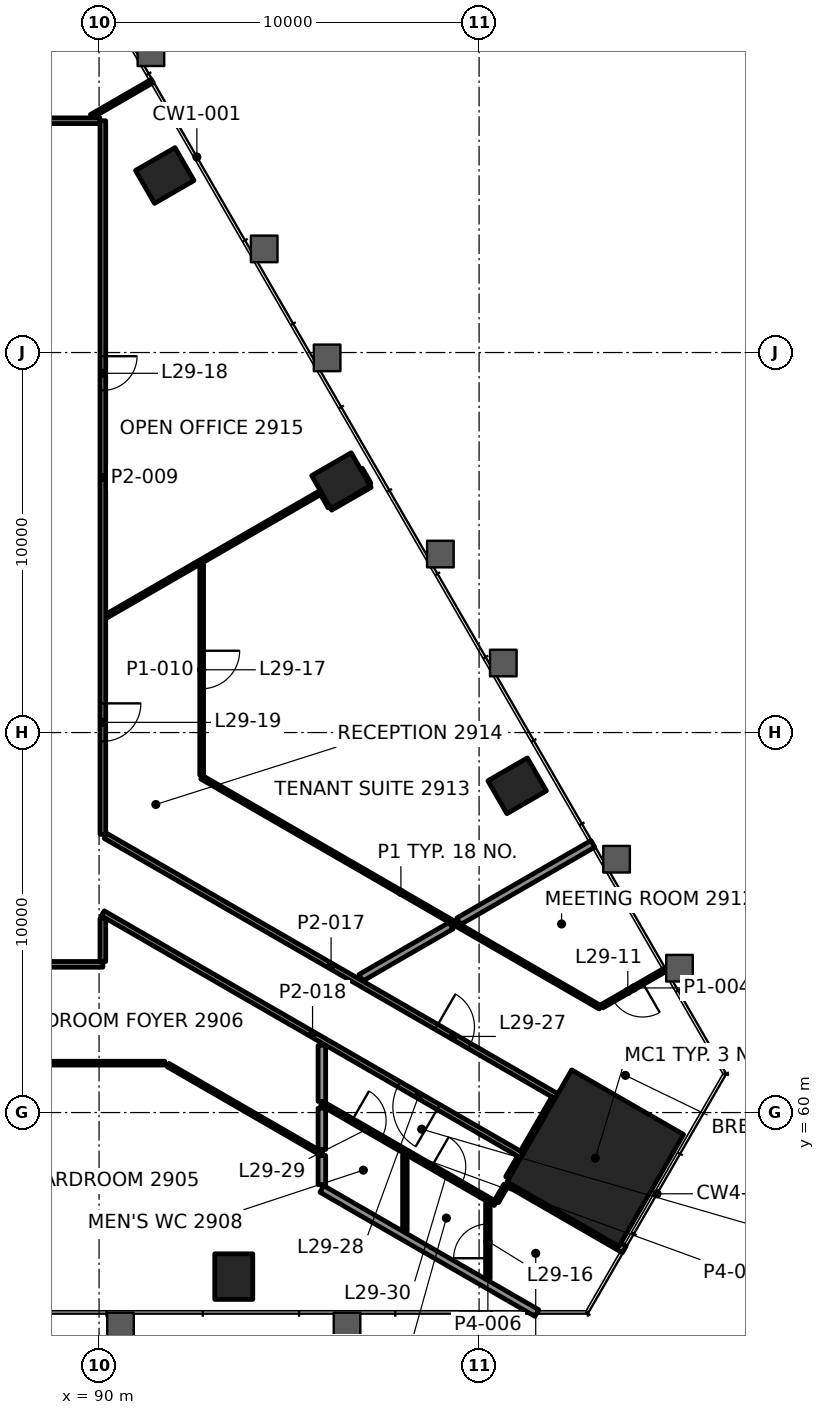
"""IFC4 building model, lengths in metres.
Left out: names, types, materials, properties, quantities, classifications, styles, units other than length and angle.
Written with IfcOpenShell. Run it as: python <this file> out.ifc"""

import sys

from ifc_helpers import new_model, si_unit, direction, frame, frame_2d, origin, origin_2d, place, context, subcontext, project, spatial, rectangle, extrude, element, fill, save


model = new_model("IFC4")
c1 = context("Model", 3, precision=1e-05, world=origin(), true_north=direction((0.0, 1.0)))
c2 = subcontext(c1, "Body", "Model", "MODEL_VIEW")
j1 = project(units=[si_unit("LENGTHUNIT", "METRE"), si_unit("PLANEANGLEUNIT", "RADIAN")], contexts=[c1])
p1 = place(None, origin())
s1 = spatial("IfcSite", under=j1, at=p1, CompositionType="ELEMENT")
p2 = place(p1, origin())
s2 = spatial("IfcBuilding", under=s1, at=p2, CompositionType="ELEMENT")
p3 = place(p2, frame((0.0, 0.0, 128.2)))
s3 = spatial("IfcBuildingStorey", under=s2, at=p3, CompositionType="ELEMENT", Elevation=128.2)
p4 = place(p3, frame((103.058, 58.801, 0.0), z_axis=(0.0, 0.0, 1.0), x_axis=(0.5, 0.866025403784, 0.0)))
e1 = element("IfcColumn", 1, at=p4, inside=s3, PredefinedType="COLUMN", context=c2, shape_type="SweptSolid", body=[
    extrude(rectangle(XDim=3.4, YDim=3.4, at=origin_2d()), origin(), (0.0, 0.0, 1.0), 4.2),
])
for number, where, z_axis, x_axis in (
    (2, (93.545, 55.683, -0.0), (0.0, 0.0, 1.0), (1.0, 0.0, 0.0)),
    (3, (101.001, 68.598, -0.0), (0.0, 0.0, 1.0), (-0.5, 0.866, 0.0)),
    (4, (96.365, 76.628, -0.0), (0.0, 0.0, 1.0), (-0.5, 0.866, 0.0)),
    (5, (91.729, 84.658, -0.0), (0.0, 0.0, 1.0), (-0.5, 0.866, 0.0)),
):
    element("IfcColumn", number, at=place(p3, frame(where, z_axis=z_axis, x_axis=x_axis)), inside=s3, PredefinedType="COLUMN", context=c2, shape_type="SweptSolid", body=[
        extrude(rectangle(XDim=1.0, YDim=1.2, at=origin_2d()), origin(), (0.0, 0.0, 1.0), 4.2),
    ])
p5 = place(p3, frame((63.41, 61.3, 0.0), z_axis=(0.0, 0.0, 1.0), x_axis=(1.0, 0.0, 0.0)))
e6 = element("IfcWall", 6, at=p5, inside=s3, PredefinedType="PARTITIONING", context=c2, shape_type="SweptSolid", body=[
    extrude(rectangle(XDim=28.319, YDim=0.1, at=frame_2d((14.16, 0.0))), origin(), (0.0, 0.0, 1.0), 3.4),
])
p6 = place(p5, frame((7.613, 0.0, 0.0)))
e7 = element("IfcOpeningElement", 7, at=p6, cuts=e6, PredefinedType="OPENING", context=c2, shape_type="SweptSolid", body=[
    extrude(rectangle(XDim=1.2, YDim=2.1, at=frame_2d((0.6, 1.05))), frame((0.0, 0.06, 0.0), z_axis=(0.0, -1.0, 0.0), x_axis=(1.0, 0.0, 0.0)), (0.0, 0.0, 1.0), 0.12),
])
p7 = place(p5, frame((21.573, 0.0, 0.0)))
e8 = element("IfcOpeningElement", 8, at=p7, cuts=e6, PredefinedType="OPENING", context=c2, shape_type="SweptSolid", body=[
    extrude(rectangle(XDim=1.2, YDim=2.1, at=frame_2d((0.6, 1.05))), frame((0.0, 0.06, 0.0), z_axis=(0.0, -1.0, 0.0), x_axis=(1.0, 0.0, 0.0)), (0.0, 0.0, 1.0), 0.12),
])
p8 = place(p3, frame((90.1, 63.9, 0.0), z_axis=(0.0, 0.0, 1.0), x_axis=(-1.0, 0.0, 0.0)))
e9 = element("IfcWall", 9, at=p8, inside=s3, PredefinedType="PARTITIONING", context=c2, shape_type="SweptSolid", body=[
    extrude(rectangle(XDim=30.2, YDim=0.15, at=frame_2d((15.1, 0.0))), origin(), (0.0, 0.0, 1.0), 3.4),
])
p9 = place(p8, frame((4.833, 0.0, 0.0)))
e10 = element("IfcOpeningElement", 10, at=p9, cuts=e9, PredefinedType="OPENING", context=c2, shape_type="SweptSolid", body=[
    extrude(rectangle(XDim=1.0, YDim=2.1, at=frame_2d((0.5, 1.05))), frame((0.0, 0.085, 0.0), z_axis=(0.0, -1.0, 0.0), x_axis=(1.0, 0.0, 0.0)), (0.0, 0.0, 1.0), 0.17),
])
p10 = place(p8, frame((18.077, 0.0, 0.0)))
e11 = element("IfcOpeningElement", 11, at=p10, cuts=e9, PredefinedType="OPENING", context=c2, shape_type="SweptSolid", body=[
    extrude(rectangle(XDim=1.0, YDim=2.1, at=frame_2d((0.5, 1.05))), frame((0.0, 0.085, 0.0), z_axis=(0.0, -1.0, 0.0), x_axis=(1.0, 0.0, 0.0)), (0.0, 0.0, 1.0), 0.17),
])
p11 = place(p8, frame((27.893, 0.0, 0.0)))
e12 = element("IfcOpeningElement", 12, at=p11, cuts=e9, PredefinedType="OPENING", context=c2, shape_type="SweptSolid", body=[
    extrude(rectangle(XDim=0.9, YDim=2.1, at=frame_2d((0.45, 1.05))), frame((0.0, 0.085, 0.0), z_axis=(0.0, -1.0, 0.0), x_axis=(1.0, 0.0, 0.0)), (0.0, 0.0, 1.0), 0.17),
])
p12 = place(p3, frame((80.375, 86.1, 0.0), z_axis=(0.0, 0.0, 1.0), x_axis=(1.0, 0.0, 0.0)))
e13 = element("IfcWall", 13, at=p12, inside=s3, PredefinedType="PARTITIONING", context=c2, shape_type="SweptSolid", body=[
    extrude(rectangle(XDim=9.649, YDim=0.15, at=frame_2d((4.825, 0.0))), origin(), (0.0, 0.0, 1.0), 3.4),
])
p13 = place(p12, frame((4.11, 0.0, 0.0)))
e14 = element("IfcOpeningElement", 14, at=p13, cuts=e13, PredefinedType="OPENING", context=c2, shape_type="SweptSolid", body=[
    extrude(rectangle(XDim=1.2, YDim=2.1, at=frame_2d((0.6, 1.05))), frame((0.0, 0.085, 0.0), z_axis=(0.0, -1.0, 0.0), x_axis=(1.0, 0.0, 0.0)), (0.0, 0.0, 1.0), 0.17),
])
p14 = place(p3, frame((104.903, 63.761, 0.0), z_axis=(0.0, 0.0, 1.0), x_axis=(-0.86605048973, -0.49995654735, 0.0)))
e15 = element("IfcWall", 15, at=p14, inside=s3, PredefinedType="PARTITIONING", context=c2, shape_type="SweptSolid", body=[
    extrude(rectangle(XDim=1.926, YDim=0.1, at=frame_2d((0.963, 0.0))), origin(), (0.0, 0.0, 1.0), 3.4),
])
p15 = place(p14, frame((0.693, 0.0, 0.0)))
e16 = element("IfcOpeningElement", 16, at=p15, cuts=e15, PredefinedType="OPENING", context=c2, shape_type="SweptSolid", body=[
    extrude(rectangle(XDim=0.9, YDim=2.1, at=frame_2d((0.45, 1.05))), frame((0.0, 0.06, 0.0), z_axis=(0.0, -1.0, 0.0), x_axis=(1.0, 0.0, 0.0)), (0.0, 0.0, 1.0), 0.12),
])
p16 = place(p3, frame((96.89, 63.548, 0.0), z_axis=(0.0, 0.0, 1.0), x_axis=(0.86604168154, 0.499971805041, 0.0)))
e17 = element("IfcWall", 17, at=p16, inside=s3, PredefinedType="PARTITIONING", context=c2, shape_type="SweptSolid", body=[
    extrude(rectangle(XDim=2.74, YDim=0.2, at=frame_2d((1.37, 0.0))), origin(), (0.0, 0.0, 1.0), 3.4),
])
p17 = place(p3, frame((96.096, 75.896, 0.0), z_axis=(0.0, 0.0, 1.0), x_axis=(0.865978732077, 0.500080829057, 0.0)))
e18 = element("IfcWall", 18, at=p17, inside=s3, PredefinedType="PARTITIONING", context=c2, shape_type="SweptSolid", body=[
    extrude(rectangle(XDim=1.199, YDim=0.1, at=frame_2d((0.6, 0.0))), origin(), (0.0, 0.0, 1.0), 3.165),
])
p18 = place(p3, frame((90.201, 73.07, 0.0), z_axis=(0.0, 0.0, 1.0), x_axis=(0.866021525041, 0.500006718121, 0.0)))
e19 = element("IfcWall", 19, at=p18, inside=s3, PredefinedType="PARTITIONING", context=c2, shape_type="SweptSolid", body=[
    extrude(rectangle(XDim=6.518, YDim=0.1, at=frame_2d((3.259, 0.0))), origin(), (0.0, 0.0, 1.0), 3.4),
])
p19 = place(p3, frame((89.797, 86.22, 0.0), z_axis=(0.0, 0.0, 1.0), x_axis=(0.866036320872, 0.499981090573, 0.0)))
e20 = element("IfcWall", 20, at=p19, inside=s3, PredefinedType="PARTITIONING", context=c2, shape_type="SweptSolid", body=[
    extrude(rectangle(XDim=1.852, YDim=0.1, at=frame_2d((0.926, 0.0))), origin(), (0.0, 0.0, 1.0), 3.165),
])
p20 = place(p3, frame((100.458, 57.658, 0.0), z_axis=(0.0, 0.0, 1.0), x_axis=(0.499895202697, 0.866085900082, 0.0)))
e21 = element("IfcWall", 21, at=p20, inside=s3, PredefinedType="PARTITIONING", context=c2, shape_type="SweptSolid", body=[
    extrude(rectangle(XDim=0.489, YDim=0.12, at=frame_2d((0.245, 0.0))), origin(), (0.0, 0.0, 1.0), 3.4),
])
p21 = place(p3, frame((100.786, 58.265, 0.0), z_axis=(0.0, 0.0, 1.0), x_axis=(0.499880341542, 0.866094477606, 0.0)))
e22 = element("IfcWall", 22, at=p21, inside=s3, PredefinedType="PARTITIONING", context=c2, shape_type="SweptSolid", body=[
    extrude(rectangle(XDim=0.625, YDim=0.2, at=frame_2d((0.312, 0.0))), origin(), (0.0, 0.0, 1.0), 3.4),
])
p22 = place(p3, frame((100.231, 55.623, 0.0), z_axis=(0.0, 0.0, 1.0), x_axis=(0.0, 1.0, 0.0)))
e23 = element("IfcWall", 23, at=p22, inside=s3, PredefinedType="PARTITIONING", context=c2, shape_type="SweptSolid", body=[
    extrude(rectangle(XDim=1.987, YDim=0.12, at=frame_2d((0.993, 0.0))), origin(), (0.0, 0.0, 1.0), 3.4),
])
p23 = place(p22, frame((0.543, 0.0, 0.0)))
e24 = element("IfcOpeningElement", 24, at=p23, cuts=e23, PredefinedType="OPENING", context=c2, shape_type="SweptSolid", body=[
    extrude(rectangle(XDim=0.9, YDim=2.1, at=frame_2d((0.45, 1.05))), frame((0.0, 0.07, 0.0), z_axis=(0.0, -1.0, 0.0), x_axis=(1.0, 0.0, 0.0)), (0.0, 0.0, 1.0), 0.14),
])
p24 = place(p3, frame((98.047, 56.884, 0.0), z_axis=(0.0, 0.0, 1.0), x_axis=(0.0, 1.0, 0.0)))
e25 = element("IfcWall", 25, at=p24, inside=s3, PredefinedType="PARTITIONING", context=c2, shape_type="SweptSolid", body=[
    extrude(rectangle(XDim=1.987, YDim=0.12, at=frame_2d((0.993, 0.0))), origin(), (0.0, 0.0, 1.0), 3.4),
])
p25 = place(p3, frame((95.863, 58.105, 0.0), z_axis=(0.0, 0.0, 1.0), x_axis=(0.0, 1.0, 0.0)))
e26 = element("IfcWall", 26, at=p25, inside=s3, PredefinedType="PARTITIONING", context=c2, shape_type="SweptSolid", body=[
    extrude(rectangle(XDim=0.765, YDim=0.2, at=frame_2d((0.383, 0.0))), origin(), (0.0, 0.0, 1.0), 3.4),
])
p26 = place(p3, frame((92.7, 74.425, 0.0), z_axis=(0.0, 0.0, 1.0), x_axis=(0.0, -1.0, 0.0)))
e27 = element("IfcWall", 27, at=p26, inside=s3, PredefinedType="PARTITIONING", context=c2, shape_type="SweptSolid", body=[
    extrude(rectangle(XDim=5.544, YDim=0.1, at=frame_2d((2.772, 0.0))), origin(), (0.0, 0.0, 1.0), 3.4),
])
p27 = place(p26, frame((2.272, 0.0, 0.0)))
e28 = element("IfcOpeningElement", 28, at=p27, cuts=e27, PredefinedType="OPENING", context=c2, shape_type="SweptSolid", body=[
    extrude(rectangle(XDim=1.0, YDim=2.1, at=frame_2d((0.5, 1.05))), frame((0.0, 0.06, 0.0), z_axis=(0.0, -1.0, 0.0), x_axis=(1.0, 0.0, 0.0)), (0.0, 0.0, 1.0), 0.12),
])
p28 = place(p3, frame((90.1, 63.975, 0.0), z_axis=(0.0, 0.0, 1.0), x_axis=(0.0, 1.0, 0.0)))
e29 = element("IfcWall", 29, at=p28, inside=s3, PredefinedType="PARTITIONING", context=c2, shape_type="SweptSolid", body=[
    extrude(rectangle(XDim=1.131, YDim=0.15, at=frame_2d((0.565, 0.0))), origin(), (0.0, 0.0, 1.0), 3.247),
])
p29 = place(p3, frame((90.1, 86.1, 0.0), z_axis=(0.0, 0.0, 1.0), x_axis=(0.0, -1.0, 0.0)))
e30 = element("IfcWall", 30, at=p29, inside=s3, PredefinedType="PARTITIONING", context=c2, shape_type="SweptSolid", body=[
    extrude(rectangle(XDim=18.778, YDim=0.15, at=frame_2d((9.389, 0.0))), origin(), (0.0, 0.0, 1.0), 3.4),
])
p30 = place(p29, frame((6.196, 0.0, 0.0)))
e31 = element("IfcOpeningElement", 31, at=p30, cuts=e30, PredefinedType="OPENING", context=c2, shape_type="SweptSolid", body=[
    extrude(rectangle(XDim=0.9, YDim=2.1, at=frame_2d((0.45, 1.05))), frame((0.0, 0.085, 0.0), z_axis=(0.0, -1.0, 0.0), x_axis=(1.0, 0.0, 0.0)), (0.0, 0.0, 1.0), 0.17),
])
p31 = place(p29, frame((15.332, 0.0, 0.0)))
e32 = element("IfcOpeningElement", 32, at=p31, cuts=e30, PredefinedType="OPENING", context=c2, shape_type="SweptSolid", body=[
    extrude(rectangle(XDim=1.0, YDim=2.1, at=frame_2d((0.5, 1.05))), frame((0.0, 0.085, 0.0), z_axis=(0.0, -1.0, 0.0), x_axis=(1.0, 0.0, 0.0)), (0.0, 0.0, 1.0), 0.17),
])
p32 = place(p3, frame((97.11, 76.539, 0.0), z_axis=(0.0, 0.0, 1.0), x_axis=(-0.500286647819, 0.865859844325, 0.0)))
e33 = element("IfcWall", 33, at=p32, inside=s3, PredefinedType="PARTITIONING", context=c2, shape_type="SweptSolid", body=[
    extrude(rectangle(XDim=0.449, YDim=0.1, at=frame_2d((0.225, 0.0))), origin(), (0.0, 0.0, 1.0), 3.4),
])
p33 = place(p3, frame((96.07, 75.939, 0.0), z_axis=(0.0, 0.0, 1.0), x_axis=(-0.50002266109, 0.866012320003, 0.0)))
e34 = element("IfcWall", 34, at=p33, inside=s3, PredefinedType="PARTITIONING", context=c2, shape_type="SweptSolid", body=[
    extrude(rectangle(XDim=0.399, YDim=0.1, at=frame_2d((0.199, 0.0))), origin(), (0.0, 0.0, 1.0), 3.4),
])
p34 = place(p3, frame((103.185, 62.769, 0.0), z_axis=(0.0, 0.0, 1.0), x_axis=(-0.866024396652, 0.5000017444, 0.0)))
e35 = element("IfcWall", 35, at=p34, inside=s3, PredefinedType="PARTITIONING", context=c2, shape_type="SweptSolid", body=[
    extrude(rectangle(XDim=12.107, YDim=0.1, at=frame_2d((6.053, 0.0))), origin(), (0.0, 0.0, 1.0), 3.4),
])
p35 = place(p3, frame((90.175, 67.278, 0.0), z_axis=(0.0, 0.0, 1.0), x_axis=(0.866022903348, -0.500004330858, 0.0)))
e36 = element("IfcWall", 36, at=p35, inside=s3, PredefinedType="PARTITIONING", context=c2, shape_type="SweptSolid", body=[
    extrude(rectangle(XDim=13.695, YDim=0.15, at=frame_2d((6.848, 0.0))), origin(), (0.0, 0.0, 1.0), 3.4),
])
p36 = place(p35, frame((10.05, 0.0, 0.0)))
e37 = element("IfcOpeningElement", 37, at=p36, cuts=e36, PredefinedType="OPENING", context=c2, shape_type="SweptSolid", body=[
    extrude(rectangle(XDim=1.0, YDim=2.1, at=frame_2d((0.5, 1.05))), frame((0.0, 0.085, 0.0), z_axis=(0.0, -1.0, 0.0), x_axis=(1.0, 0.0, 0.0)), (0.0, 0.0, 1.0), 0.17),
])
p37 = place(p3, frame((101.136, 58.871, 0.0), z_axis=(0.0, 0.0, 1.0), x_axis=(-0.866020317169, 0.500008810174, 0.0)))
e38 = element("IfcWall", 38, at=p37, inside=s3, PredefinedType="PARTITIONING", context=c2, shape_type="SweptSolid", body=[
    extrude(rectangle(XDim=12.743, YDim=0.15, at=frame_2d((6.372, 0.0))), origin(), (0.0, 0.0, 1.0), 3.247),
])
p38 = place(p37, frame((2.546, 0.0, 0.0)))
e39 = element("IfcOpeningElement", 39, at=p38, cuts=e38, PredefinedType="OPENING", context=c2, shape_type="SweptSolid", body=[
    extrude(rectangle(XDim=1.2, YDim=2.1, at=frame_2d((0.6, 1.05))), frame((0.0, 0.085, 0.0), z_axis=(0.0, -1.0, 0.0), x_axis=(1.0, 0.0, 0.0)), (0.0, 0.0, 1.0), 0.17),
])
p39 = place(p3, frame((103.819, 56.398, 0.0), z_axis=(0.0, 0.0, 1.0), x_axis=(-0.866004308173, 0.500036536891, 0.0)))
e40 = element("IfcWall", 40, at=p39, inside=s3, PredefinedType="PARTITIONING", context=c2, shape_type="SweptSolid", body=[
    extrude(rectangle(XDim=3.544, YDim=0.2, at=frame_2d((1.772, 0.0))), origin(), (0.0, 0.0, 1.0), 3.4),
])
p40 = place(p3, frame((95.863, 60.241, 0.0), z_axis=(0.0, 0.0, 1.0), x_axis=(0.866028224559, -0.499995114243, 0.0)))
e41 = element("IfcWall", 41, at=p40, inside=s3, PredefinedType="PARTITIONING", context=c2, shape_type="SweptSolid", body=[
    extrude(rectangle(XDim=5.271, YDim=0.12, at=frame_2d((2.635, 0.0))), origin(), (0.0, 0.0, 1.0), 3.4),
])
p41 = place(p40, frame((0.913, 0.0, 0.0)))
e42 = element("IfcOpeningElement", 42, at=p41, cuts=e41, PredefinedType="OPENING", context=c2, shape_type="SweptSolid", body=[
    extrude(rectangle(XDim=0.9, YDim=2.1, at=frame_2d((0.45, 1.05))), frame((0.0, 0.07, 0.0), z_axis=(0.0, -1.0, 0.0), x_axis=(1.0, 0.0, 0.0)), (0.0, 0.0, 1.0), 0.14),
])
p42 = place(p40, frame((3.333, 0.0, 0.0)))
e43 = element("IfcOpeningElement", 43, at=p42, cuts=e41, PredefinedType="OPENING", context=c2, shape_type="SweptSolid", body=[
    extrude(rectangle(XDim=0.9, YDim=2.1, at=frame_2d((0.45, 1.05))), frame((0.0, 0.07, 0.0), z_axis=(0.0, -1.0, 0.0), x_axis=(1.0, 0.0, 0.0)), (0.0, 0.0, 1.0), 0.14),
])
p43 = place(p3, frame((95.863, 58.914, 0.0), z_axis=(0.0, 0.0, 1.0), x_axis=(-0.866042039906, 0.499971184285, 0.0)))
e44 = element("IfcWall", 44, at=p43, inside=s3, PredefinedType="PARTITIONING", context=c2, shape_type="SweptSolid", body=[
    extrude(rectangle(XDim=4.673, YDim=0.1, at=frame_2d((2.336, 0.0))), origin(), (0.0, 0.0, 1.0), 3.4),
])
p44 = place(p3, frame((101.521, 54.723, 0.0), z_axis=(0.0, 0.0, 1.0), x_axis=(-0.866020061583, 0.50000925285, 0.0)))
e45 = element("IfcWall", 45, at=p44, inside=s3, PredefinedType="PARTITIONING", context=c2, shape_type="SweptSolid", body=[
    extrude(rectangle(XDim=6.534, YDim=0.2, at=frame_2d((3.267, 0.0))), origin(), (0.0, 0.0, 1.0), 3.4),
])
p45 = place(p3, frame((99.463, 65.033, 0.0), z_axis=(0.0, 0.0, 1.0), x_axis=(0.866014978466, 0.500018056747, 0.0)))
e46 = element("IfcWall", 46, at=p45, inside=s3, PredefinedType="PARTITIONING", context=c2, shape_type="SweptSolid", body=[
    extrude(rectangle(XDim=4.075, YDim=0.2, at=frame_2d((2.038, 0.0))), origin(), (0.0, 0.0, 1.0), 3.4),
])
p46 = place(p3, frame((101.174, 58.936, 0.0), z_axis=(0.0, 0.0, 1.0), x_axis=(0.499991515992, 0.866030301974, 0.0)))
e47 = element("IfcWall", 47, at=p46, inside=s3, PredefinedType="PARTITIONING", context=c2, shape_type="SweptSolid", body=[
    extrude(rectangle(XDim=1.649, YDim=0.2, at=frame_2d((0.825, 0.0))), origin(), (0.0, 0.0, 1.0), 3.247),
])
p47 = place(p3, frame((95.863, 60.293, 0.0), z_axis=(0.0, 0.0, 1.0), x_axis=(0.0, 1.0, 0.0)))
e48 = element("IfcWall", 48, at=p47, inside=s3, PredefinedType="PARTITIONING", context=c2, shape_type="SweptSolid", body=[
    extrude(rectangle(XDim=1.476, YDim=0.2, at=frame_2d((0.738, 0.0))), origin(), (0.0, 0.0, 1.0), 3.4),
])
p48 = place(p3, frame((95.863, 59.029, 0.0), z_axis=(0.0, 0.0, 1.0), x_axis=(0.0, 1.0, 0.0)))
e49 = element("IfcWall", 49, at=p48, inside=s3, PredefinedType="PARTITIONING", context=c2, shape_type="SweptSolid", body=[
    extrude(rectangle(XDim=1.085, YDim=0.2, at=frame_2d((0.543, 0.0))), origin(), (0.0, 0.0, 1.0), 3.4),
])
p49 = place(p15, origin())
e50 = element("IfcDoor", 50, at=p49, inside=s3, OperationType="SINGLE_SWING_RIGHT", PredefinedType="DOOR", context=c2, shape_type="SweptSolid", body=[
    extrude(rectangle(XDim=0.9, YDim=2.1, at=frame_2d((0.45, 1.05))), frame((0.0, 0.025, 0.0), z_axis=(0.0, -1.0, 0.0), x_axis=(1.0, 0.0, 0.0)), (0.0, 0.0, 1.0), 0.05),
])
fill(e16, e50)
p50 = place(p23, origin())
e51 = element("IfcDoor", 51, at=p50, inside=s3, OperationType="SINGLE_SWING_LEFT", PredefinedType="DOOR", context=c2, shape_type="SweptSolid", body=[
    extrude(rectangle(XDim=0.9, YDim=2.1, at=frame_2d((0.45, 1.05))), frame((0.0, 0.025, 0.0), z_axis=(0.0, -1.0, 0.0), x_axis=(1.0, 0.0, 0.0)), (0.0, 0.0, 1.0), 0.05),
])
fill(e24, e51)
p51 = place(p27, origin())
e52 = element("IfcDoor", 52, at=p51, inside=s3, OperationType="SINGLE_SWING_LEFT", PredefinedType="DOOR", context=c2, shape_type="SweptSolid", body=[
    extrude(rectangle(XDim=1.0, YDim=2.1, at=frame_2d((0.5, 1.05))), frame((0.0, 0.025, 0.0), z_axis=(0.0, -1.0, 0.0), x_axis=(1.0, 0.0, 0.0)), (0.0, 0.0, 1.0), 0.05),
])
fill(e28, e52)
p52 = place(p30, origin())
e53 = element("IfcDoor", 53, at=p52, inside=s3, OperationType="SINGLE_SWING_LEFT", PredefinedType="DOOR", context=c2, shape_type="SweptSolid", body=[
    extrude(rectangle(XDim=0.9, YDim=2.1, at=frame_2d((0.45, 1.05))), frame((0.0, 0.025, 0.0), z_axis=(0.0, -1.0, 0.0), x_axis=(1.0, 0.0, 0.0)), (0.0, 0.0, 1.0), 0.05),
])
fill(e31, e53)
p53 = place(p31, origin())
e54 = element("IfcDoor", 54, at=p53, inside=s3, OperationType="SINGLE_SWING_RIGHT", PredefinedType="DOOR", context=c2, shape_type="SweptSolid", body=[
    extrude(rectangle(XDim=1.0, YDim=2.1, at=frame_2d((0.5, 1.05))), frame((0.0, 0.025, 0.0), z_axis=(0.0, -1.0, 0.0), x_axis=(1.0, 0.0, 0.0)), (0.0, 0.0, 1.0), 0.05),
])
fill(e32, e54)
p54 = place(p36, origin())
e55 = element("IfcDoor", 55, at=p54, inside=s3, OperationType="SINGLE_SWING_LEFT", PredefinedType="DOOR", context=c2, shape_type="SweptSolid", body=[
    extrude(rectangle(XDim=1.0, YDim=2.1, at=frame_2d((0.5, 1.05))), frame((0.0, 0.025, 0.0), z_axis=(0.0, -1.0, 0.0), x_axis=(1.0, 0.0, 0.0)), (0.0, 0.0, 1.0), 0.05),
])
fill(e37, e55)
p55 = place(p38, origin())
e56 = element("IfcDoor", 56, at=p55, inside=s3, OperationType="DOUBLE_DOOR_SINGLE_SWING", PredefinedType="DOOR", context=c2, shape_type="SweptSolid", body=[
    extrude(rectangle(XDim=1.2, YDim=2.1, at=frame_2d((0.6, 1.05))), frame((0.0, 0.025, 0.0), z_axis=(0.0, -1.0, 0.0), x_axis=(1.0, 0.0, 0.0)), (0.0, 0.0, 1.0), 0.05),
])
fill(e39, e56)
p56 = place(p41, origin())
e57 = element("IfcDoor", 57, at=p56, inside=s3, OperationType="SINGLE_SWING_RIGHT", PredefinedType="DOOR", context=c2, shape_type="SweptSolid", body=[
    extrude(rectangle(XDim=0.9, YDim=2.1, at=frame_2d((0.45, 1.05))), frame((0.0, 0.025, 0.0), z_axis=(0.0, -1.0, 0.0), x_axis=(1.0, 0.0, 0.0)), (0.0, 0.0, 1.0), 0.05),
])
fill(e42, e57)
p57 = place(p42, origin())
e58 = element("IfcDoor", 58, at=p57, inside=s3, OperationType="SINGLE_SWING_LEFT", PredefinedType="DOOR", context=c2, shape_type="SweptSolid", body=[
    extrude(rectangle(XDim=0.9, YDim=2.1, at=frame_2d((0.45, 1.05))), frame((0.0, 0.025, 0.0), z_axis=(0.0, -1.0, 0.0), x_axis=(1.0, 0.0, 0.0)), (0.0, 0.0, 1.0), 0.05),
])
fill(e43, e58)
save(model, sys.argv[1])
